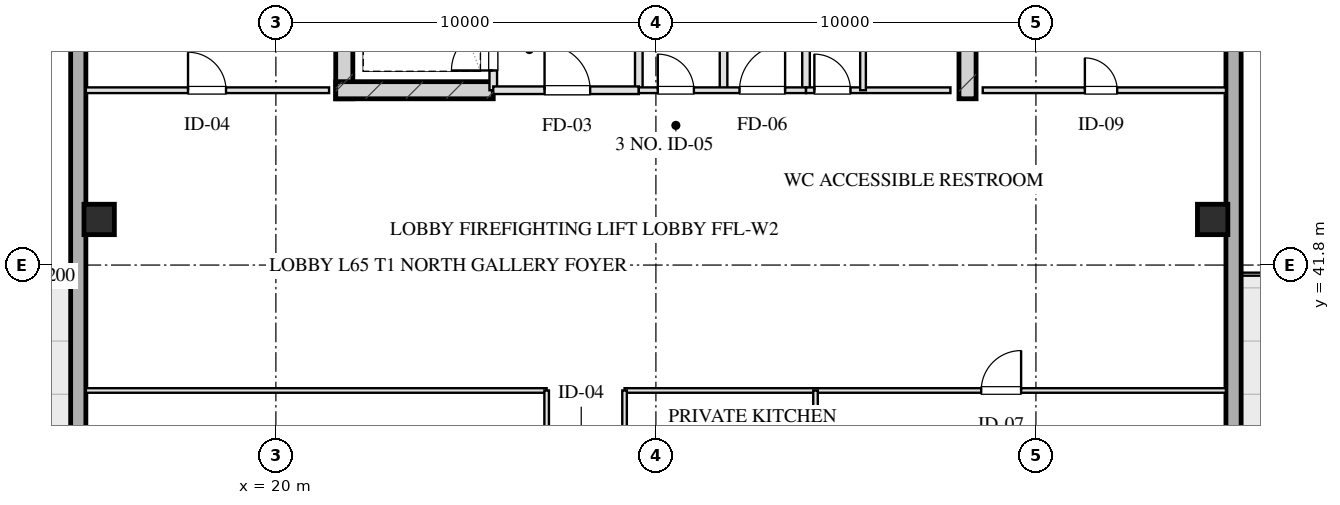
"""IFC4 building model, lengths in metres.
Left out: names, types, materials, properties, quantities, classifications, styles, units other than length and angle.
Written with IfcOpenShell. Run it as: python <this file> out.ifc"""

import sys

from ifc_helpers import new_model, si_unit, direction, frame, frame_2d, origin, origin_2d, place, context, subcontext, project, spatial, rectangle, hollow_rectangle, extrude, element, fill, save


model = new_model("IFC4")
c1 = context("Model", 3, precision=1e-05, world=origin(), true_north=direction((0.0, 1.0)))
c2 = subcontext(c1, "Body", "Model", "MODEL_VIEW")
j1 = project(units=[si_unit("LENGTHUNIT", "METRE"), si_unit("PLANEANGLEUNIT", "RADIAN")], contexts=[c1])
p1 = place(None, origin())
s1 = spatial("IfcSite", under=j1, at=p1, CompositionType="ELEMENT")
p2 = place(p1, origin())
s2 = spatial("IfcBuilding", under=s1, at=p2, CompositionType="ELEMENT")
p3 = place(p2, frame((0.0, 0.0, 240.8)))
s3 = spatial("IfcBuildingStorey", under=s2, at=p3, CompositionType="ELEMENT", Elevation=240.8)
for number, where, z_axis, x_axis in (
    (1, (21.8, 46.175, 0.0), (0.0, 0.0, 1.0), (0.0, 1.0, 0.0)),
    (2, (38.2, 46.175, 0.0), (0.0, 0.0, 1.0), (0.0, 1.0, 0.0)),
):
    element("IfcWall", number, at=place(p3, frame(where, z_axis=z_axis, x_axis=x_axis)), inside=s3, PredefinedType="SHEAR", context=c2, shape_type="SweptSolid", body=[
        extrude(rectangle(XDim=9.33, YDim=0.45, at=frame_2d((4.665, 0.0))), origin(), (0.0, 0.0, 1.0), 3.2),
    ])
p4 = place(p3, frame((21.575, 46.4, 0.0), z_axis=(0.0, 0.0, 1.0), x_axis=(1.0, 0.0, 0.0)))
e3 = element("IfcWall", 3, at=p4, inside=s3, PredefinedType="SHEAR", context=c2, shape_type="SweptSolid", body=[
    extrude(rectangle(XDim=4.145, YDim=0.45, at=frame_2d((2.073, 0.0))), origin(), (0.0, 0.0, 1.0), 3.2),
])
for number, where, z_axis, x_axis in (
    (4, (15.35, 43.0, 0.0), (0.0, 0.0, 1.0), (1.0, 0.0, 0.0)),
    (5, (44.65, 43.0, 0.0), (0.0, 0.0, 1.0), (1.0, 0.0, 0.0)),
):
    element("IfcColumn", number, at=place(p3, frame(where, z_axis=z_axis, x_axis=x_axis)), inside=s3, PredefinedType="COLUMN", context=c2, shape_type="SweptSolid", body=[
        extrude(hollow_rectangle(XDim=0.8, YDim=0.8, WallThickness=0.028, at=origin_2d()), origin(), (0.0, 0.0, 1.0), 3.201),
    ])
p5 = place(p3, frame((14.8, 13.1, 0.0), z_axis=(0.0, 0.0, 1.0), x_axis=(0.0, 1.0, 0.0)))
e6 = element("IfcWall", 6, at=p5, inside=s3, PredefinedType="SOLIDWALL", context=c2, shape_type="SweptSolid", body=[
    extrude(rectangle(XDim=41.8, YDim=0.4, at=frame_2d((20.9, 0.0))), origin(), (0.0, 0.0, 1.0), 2.36),
])
p6 = place(p5, frame((13.525, 0.0, 0.75)))
e7 = element("IfcOpeningElement", 7, at=p6, cuts=e6, PredefinedType="OPENING", context=c2, shape_type="SweptSolid", body=[
    extrude(rectangle(XDim=1.95, YDim=1.21, at=frame_2d((0.975, 0.605))), frame((0.0, 0.21, 0.0), z_axis=(0.0, -1.0, 0.0), x_axis=(1.0, 0.0, 0.0)), (0.0, 0.0, 1.0), 0.42),
])
p7 = place(p5, frame((17.325, 0.0, 0.75)))
e8 = element("IfcOpeningElement", 8, at=p7, cuts=e6, PredefinedType="OPENING", context=c2, shape_type="SweptSolid", body=[
    extrude(rectangle(XDim=1.95, YDim=1.21, at=frame_2d((0.975, 0.605))), frame((0.0, 0.21, 0.0), z_axis=(0.0, -1.0, 0.0), x_axis=(1.0, 0.0, 0.0)), (0.0, 0.0, 1.0), 0.42),
])
p8 = place(p5, frame((23.2, 0.0, 0.0)))
e9 = element("IfcOpeningElement", 9, at=p8, cuts=e6, PredefinedType="OPENING", context=c2, shape_type="SweptSolid", body=[
    extrude(rectangle(XDim=1.1, YDim=2.15, at=frame_2d((0.55, 1.075))), frame((0.0, 0.21, 0.0), z_axis=(0.0, -1.0, 0.0), x_axis=(1.0, 0.0, 0.0)), (0.0, 0.0, 1.0), 0.42),
])
p9 = place(p3, frame((45.2, 54.9, 0.0), z_axis=(0.0, 0.0, 1.0), x_axis=(0.0, -1.0, 0.0)))
e10 = element("IfcWall", 10, at=p9, inside=s3, PredefinedType="SOLIDWALL", context=c2, shape_type="SweptSolid", body=[
    extrude(rectangle(XDim=41.8, YDim=0.4, at=frame_2d((20.9, 0.0))), origin(), (0.0, 0.0, 1.0), 2.36),
])
p10 = place(p9, frame((26.325, 0.0, 0.75)))
e11 = element("IfcOpeningElement", 11, at=p10, cuts=e10, PredefinedType="OPENING", context=c2, shape_type="SweptSolid", body=[
    extrude(rectangle(XDim=1.95, YDim=1.21, at=frame_2d((0.975, 0.605))), frame((0.0, 0.21, 0.0), z_axis=(0.0, -1.0, 0.0), x_axis=(1.0, 0.0, 0.0)), (0.0, 0.0, 1.0), 0.42),
])
p11 = place(p9, frame((22.525, 0.0, 0.75)))
e12 = element("IfcOpeningElement", 12, at=p11, cuts=e10, PredefinedType="OPENING", context=c2, shape_type="SweptSolid", body=[
    extrude(rectangle(XDim=1.95, YDim=1.21, at=frame_2d((0.975, 0.605))), frame((0.0, 0.21, 0.0), z_axis=(0.0, -1.0, 0.0), x_axis=(1.0, 0.0, 0.0)), (0.0, 0.0, 1.0), 0.42),
])
p12 = place(p9, frame((17.5, 0.0, 0.0)))
e13 = element("IfcOpeningElement", 13, at=p12, cuts=e10, PredefinedType="OPENING", context=c2, shape_type="SweptSolid", body=[
    extrude(rectangle(XDim=1.1, YDim=2.15, at=frame_2d((0.55, 1.075))), frame((0.0, 0.21, 0.0), z_axis=(0.0, -1.0, 0.0), x_axis=(1.0, 0.0, 0.0)), (0.0, 0.0, 1.0), 0.42),
])
p13 = place(p3, frame((25.72, 46.4, 0.0), z_axis=(0.0, 0.0, 1.0), x_axis=(0.0, 1.0, 0.0)))
e14 = element("IfcWall", 14, at=p13, inside=s3, PredefinedType="PARTITIONING", context=c2, shape_type="SweptSolid", body=[
    extrude(rectangle(XDim=1.9, YDim=0.2, at=frame_2d((0.95, 0.0))), origin(), (0.0, 0.0, 1.0), 2.925),
])
p14 = place(p13, frame((0.52, 0.0, 0.0)))
e15 = element("IfcOpeningElement", 15, at=p14, cuts=e14, PredefinedType="OPENING", context=c2, shape_type="SweptSolid", body=[
    extrude(rectangle(XDim=1.1, YDim=2.05, at=frame_2d((0.55, 1.025))), frame((0.0, 0.11, 0.0), z_axis=(0.0, -1.0, 0.0), x_axis=(1.0, 0.0, 0.0)), (0.0, 0.0, 1.0), 0.22),
])
p15 = place(p3, frame((29.55, 46.4, 0.0), z_axis=(0.0, 0.0, 1.0), x_axis=(0.0, 1.0, 0.0)))
e16 = element("IfcWall", 16, at=p15, inside=s3, PredefinedType="PARTITIONING", context=c2, shape_type="SweptSolid", body=[
    extrude(rectangle(XDim=8.43, YDim=0.2, at=frame_2d((4.215, 0.0))), origin(), (0.0, 0.0, 1.0), 2.925),
])
p16 = place(p3, frame((25.72, 46.4, 0.0), z_axis=(0.0, 0.0, 1.0), x_axis=(1.0, 0.0, 0.0)))
e17 = element("IfcWall", 17, at=p16, inside=s3, PredefinedType="PARTITIONING", context=c2, shape_type="SweptSolid", body=[
    extrude(rectangle(XDim=3.83, YDim=0.2, at=frame_2d((1.915, 0.0))), origin(), (0.0, 0.0, 1.0), 2.925),
])
p17 = place(p16, frame((1.35, 0.0, 0.0)))
e18 = element("IfcOpeningElement", 18, at=p17, cuts=e17, PredefinedType="OPENING", context=c2, shape_type="SweptSolid", body=[
    extrude(rectangle(XDim=1.2, YDim=2.05, at=frame_2d((0.6, 1.025))), frame((0.0, 0.11, 0.0), z_axis=(0.0, -1.0, 0.0), x_axis=(1.0, 0.0, 0.0)), (0.0, 0.0, 1.0), 0.22),
])
for number, where, z_axis, x_axis in (
    (19, (33.95, 46.4, 0.0), (0.0, 0.0, 1.0), (0.0, 1.0, 0.0)),
    (20, (31.78, 46.4, 0.0), (0.0, 0.0, 1.0), (0.0, 1.0, 0.0)),
):
    element("IfcWall", number, at=place(p3, frame(where, z_axis=z_axis, x_axis=x_axis)), inside=s3, PredefinedType="PARTITIONING", context=c2, shape_type="SweptSolid", body=[
        extrude(rectangle(XDim=8.43, YDim=0.2, at=frame_2d((4.215, 0.0))), origin(), (0.0, 0.0, 1.0), 2.925),
    ])
p18 = place(p3, frame((29.55, 46.4, 0.0), z_axis=(0.0, 0.0, 1.0), x_axis=(1.0, 0.0, 0.0)))
e21 = element("IfcWall", 21, at=p18, inside=s3, PredefinedType="PARTITIONING", context=c2, shape_type="SweptSolid", body=[
    extrude(rectangle(XDim=4.4, YDim=0.15, at=frame_2d((2.2, 0.0))), origin(), (0.0, 0.0, 1.0), 2.925),
])
p19 = place(p18, frame((0.5, 0.0, 0.0)))
e22 = element("IfcOpeningElement", 22, at=p19, cuts=e21, PredefinedType="OPENING", context=c2, shape_type="SweptSolid", body=[
    extrude(rectangle(XDim=0.95, YDim=2.05, at=frame_2d((0.475, 1.025))), frame((0.0, 0.085, 0.0), z_axis=(0.0, -1.0, 0.0), x_axis=(1.0, 0.0, 0.0)), (0.0, 0.0, 1.0), 0.17),
])
p20 = place(p18, frame((2.65, 0.0, 0.0)))
e23 = element("IfcOpeningElement", 23, at=p20, cuts=e21, PredefinedType="OPENING", context=c2, shape_type="SweptSolid", body=[
    extrude(rectangle(XDim=1.2, YDim=2.05, at=frame_2d((0.6, 1.025))), frame((0.0, 0.085, 0.0), z_axis=(0.0, -1.0, 0.0), x_axis=(1.0, 0.0, 0.0)), (0.0, 0.0, 1.0), 0.17),
])
p21 = place(p3, frame((33.95, 46.4, 0.0), z_axis=(0.0, 0.0, 1.0), x_axis=(1.0, 0.0, 0.0)))
e24 = element("IfcWall", 24, at=p21, inside=s3, PredefinedType="PARTITIONING", context=c2, shape_type="SweptSolid", body=[
    extrude(rectangle(XDim=3.8, YDim=0.15, at=frame_2d((1.9, 0.0))), origin(), (0.0, 0.0, 1.0), 2.925),
])
p22 = place(p21, frame((0.22, 0.0, 0.0)))
e25 = element("IfcOpeningElement", 25, at=p22, cuts=e24, PredefinedType="OPENING", context=c2, shape_type="SweptSolid", body=[
    extrude(rectangle(XDim=0.95, YDim=2.05, at=frame_2d((0.475, 1.025))), frame((0.0, 0.085, 0.0), z_axis=(0.0, -1.0, 0.0), x_axis=(1.0, 0.0, 0.0)), (0.0, 0.0, 1.0), 0.17),
])
p23 = place(p3, frame((35.45, 46.4, 0.0), z_axis=(0.0, 0.0, 1.0), x_axis=(0.0, 1.0, 0.0)))
e26 = element("IfcWall", 26, at=p23, inside=s3, PredefinedType="PARTITIONING", context=c2, shape_type="SweptSolid", body=[
    extrude(rectangle(XDim=8.43, YDim=0.15, at=frame_2d((4.215, 0.0))), origin(), (0.0, 0.0, 1.0), 2.565),
])
p24 = place(p23, frame((2.55, 0.0, 0.0)))
e27 = element("IfcOpeningElement", 27, at=p24, cuts=e26, PredefinedType="OPENING", context=c2, shape_type="SweptSolid", body=[
    extrude(rectangle(XDim=0.95, YDim=2.05, at=frame_2d((0.475, 1.025))), frame((0.0, 0.085, 0.0), z_axis=(0.0, -1.0, 0.0), x_axis=(1.0, 0.0, 0.0)), (0.0, 0.0, 1.0), 0.17),
])
p25 = place(p23, frame((5.8, 0.0, 0.0)))
e28 = element("IfcOpeningElement", 28, at=p25, cuts=e26, PredefinedType="OPENING", context=c2, shape_type="SweptSolid", body=[
    extrude(rectangle(XDim=0.9, YDim=2.05, at=frame_2d((0.45, 1.025))), frame((0.0, 0.085, 0.0), z_axis=(0.0, -1.0, 0.0), x_axis=(1.0, 0.0, 0.0)), (0.0, 0.0, 1.0), 0.17),
])
p26 = place(p3, frame((15.0, 46.4, 0.0), z_axis=(0.0, 0.0, 1.0), x_axis=(1.0, 0.0, 0.0)))
e29 = element("IfcWall", 29, at=p26, inside=s3, PredefinedType="PARTITIONING", context=c2, shape_type="SweptSolid", body=[
    extrude(rectangle(XDim=6.4, YDim=0.15, at=frame_2d((3.2, 0.0))), origin(), (0.0, 0.0, 1.0), 2.925),
])
p27 = place(p26, frame((2.688, 0.0, 0.0)))
e30 = element("IfcOpeningElement", 30, at=p27, cuts=e29, PredefinedType="OPENING", context=c2, shape_type="SweptSolid", body=[
    extrude(rectangle(XDim=1.0, YDim=2.05, at=frame_2d((0.5, 1.025))), frame((0.0, 0.085, 0.0), z_axis=(0.0, -1.0, 0.0), x_axis=(1.0, 0.0, 0.0)), (0.0, 0.0, 1.0), 0.17),
])
p28 = place(p3, frame((38.6, 46.4, 0.0), z_axis=(0.0, 0.0, 1.0), x_axis=(1.0, 0.0, 0.0)))
e31 = element("IfcWall", 31, at=p28, inside=s3, PredefinedType="PARTITIONING", context=c2, shape_type="SweptSolid", body=[
    extrude(rectangle(XDim=6.4, YDim=0.15, at=frame_2d((3.2, 0.0))), origin(), (0.0, 0.0, 1.0), 2.925),
])
p29 = place(p28, frame((2.688, 0.0, 0.0)))
e32 = element("IfcOpeningElement", 32, at=p29, cuts=e31, PredefinedType="OPENING", context=c2, shape_type="SweptSolid", body=[
    extrude(rectangle(XDim=0.85, YDim=2.05, at=frame_2d((0.425, 1.025))), frame((0.0, 0.085, 0.0), z_axis=(0.0, -1.0, 0.0), x_axis=(1.0, 0.0, 0.0)), (0.0, 0.0, 1.0), 0.17),
])
p30 = place(p3, frame((15.0, 38.5, 0.0), z_axis=(0.0, 0.0, 1.0), x_axis=(1.0, 0.0, 0.0)))
e33 = element("IfcWall", 33, at=p30, inside=s3, PredefinedType="PARTITIONING", context=c2, shape_type="SweptSolid", body=[
    extrude(rectangle(XDim=12.125, YDim=0.12, at=frame_2d((6.062, 0.0))), origin(), (0.0, 0.0, 1.0), 2.925),
])
p31 = place(p3, frame((29.175, 38.5, 0.0), z_axis=(0.0, 0.0, 1.0), x_axis=(1.0, 0.0, 0.0)))
e34 = element("IfcWall", 34, at=p31, inside=s3, PredefinedType="PARTITIONING", context=c2, shape_type="SweptSolid", body=[
    extrude(rectangle(XDim=15.825, YDim=0.12, at=frame_2d((7.913, 0.0))), origin(), (0.0, 0.0, 1.0), 2.925),
])
p32 = place(p31, frame((9.385, 0.0, 0.0)))
e35 = element("IfcOpeningElement", 35, at=p32, cuts=e34, PredefinedType="OPENING", context=c2, shape_type="SweptSolid", body=[
    extrude(rectangle(XDim=1.05, YDim=2.05, at=frame_2d((0.525, 1.025))), frame((0.0, 0.07, 0.0), z_axis=(0.0, -1.0, 0.0), x_axis=(1.0, 0.0, 0.0)), (0.0, 0.0, 1.0), 0.14),
])
p33 = place(p3, frame((27.125, 29.5, 0.0), z_axis=(0.0, 0.0, 1.0), x_axis=(0.0, 1.0, 0.0)))
e36 = element("IfcWall", 36, at=p33, inside=s3, PredefinedType="PARTITIONING", context=c2, shape_type="SweptSolid", body=[
    extrude(rectangle(XDim=9.0, YDim=0.12, at=frame_2d((4.5, 0.0))), origin(), (0.0, 0.0, 1.0), 2.925),
])
p34 = place(p33, frame((2.335, 0.0, 0.0)))
e37 = element("IfcOpeningElement", 37, at=p34, cuts=e36, PredefinedType="OPENING", context=c2, shape_type="SweptSolid", body=[
    extrude(rectangle(XDim=1.0, YDim=2.05, at=frame_2d((0.5, 1.025))), frame((0.0, 0.07, 0.0), z_axis=(0.0, -1.0, 0.0), x_axis=(1.0, 0.0, 0.0)), (0.0, 0.0, 1.0), 0.14),
])
p35 = place(p33, frame((6.835, 0.0, 0.0)))
e38 = element("IfcOpeningElement", 38, at=p35, cuts=e36, PredefinedType="OPENING", context=c2, shape_type="SweptSolid", body=[
    extrude(rectangle(XDim=1.0, YDim=2.05, at=frame_2d((0.5, 1.025))), frame((0.0, 0.07, 0.0), z_axis=(0.0, -1.0, 0.0), x_axis=(1.0, 0.0, 0.0)), (0.0, 0.0, 1.0), 0.14),
])
p36 = place(p3, frame((29.175, 29.5, 0.0), z_axis=(0.0, 0.0, 1.0), x_axis=(0.0, 1.0, 0.0)))
e39 = element("IfcWall", 39, at=p36, inside=s3, PredefinedType="PARTITIONING", context=c2, shape_type="SweptSolid", body=[
    extrude(rectangle(XDim=9.0, YDim=0.12, at=frame_2d((4.5, 0.0))), origin(), (0.0, 0.0, 1.0), 2.925),
])
p37 = place(p36, frame((1.165, 0.0, 0.0)))
e40 = element("IfcOpeningElement", 40, at=p37, cuts=e39, PredefinedType="OPENING", context=c2, shape_type="SweptSolid", body=[
    extrude(rectangle(XDim=1.0, YDim=2.05, at=frame_2d((0.5, 1.025))), frame((0.0, 0.07, 0.0), z_axis=(0.0, -1.0, 0.0), x_axis=(1.0, 0.0, 0.0)), (0.0, 0.0, 1.0), 0.14),
])
p38 = place(p36, frame((4.0, 0.0, 0.0)))
e41 = element("IfcOpeningElement", 41, at=p38, cuts=e39, PredefinedType="OPENING", context=c2, shape_type="SweptSolid", body=[
    extrude(rectangle(XDim=1.0, YDim=2.05, at=frame_2d((0.5, 1.025))), frame((0.0, 0.07, 0.0), z_axis=(0.0, -1.0, 0.0), x_axis=(1.0, 0.0, 0.0)), (0.0, 0.0, 1.0), 0.14),
])
p39 = place(p36, frame((6.835, 0.0, 0.0)))
e42 = element("IfcOpeningElement", 42, at=p39, cuts=e39, PredefinedType="OPENING", context=c2, shape_type="SweptSolid", body=[
    extrude(rectangle(XDim=1.0, YDim=2.05, at=frame_2d((0.5, 1.025))), frame((0.0, 0.07, 0.0), z_axis=(0.0, -1.0, 0.0), x_axis=(1.0, 0.0, 0.0)), (0.0, 0.0, 1.0), 0.14),
])
p40 = place(p3, frame((34.2, 35.17, 0.0), z_axis=(0.0, 0.0, 1.0), x_axis=(0.0, 1.0, 0.0)))
e43 = element("IfcWall", 43, at=p40, inside=s3, PredefinedType="PARTITIONING", context=c2, shape_type="SweptSolid", body=[
    extrude(rectangle(XDim=3.33, YDim=0.12, at=frame_2d((1.665, 0.0))), origin(), (0.0, 0.0, 1.0), 2.925),
])
p41 = place(p14, origin())
e44 = element("IfcDoor", 44, at=p41, inside=s3, OperationType="SINGLE_SWING_LEFT", PredefinedType="DOOR", context=c2, shape_type="SweptSolid", body=[
    extrude(rectangle(XDim=1.1, YDim=2.05, at=frame_2d((0.55, 1.025))), frame((0.0, 0.025, 0.0), z_axis=(0.0, -1.0, 0.0), x_axis=(1.0, 0.0, 0.0)), (0.0, 0.0, 1.0), 0.05),
])
fill(e15, e44)
p42 = place(p17, origin())
e45 = element("IfcDoor", 45, at=p42, inside=s3, OperationType="SINGLE_SWING_LEFT", PredefinedType="DOOR", context=c2, shape_type="SweptSolid", body=[
    extrude(rectangle(XDim=1.2, YDim=2.05, at=frame_2d((0.6, 1.025))), frame((0.0, 0.025, 0.0), z_axis=(0.0, -1.0, 0.0), x_axis=(1.0, 0.0, 0.0)), (0.0, 0.0, 1.0), 0.05),
])
fill(e18, e45)
p43 = place(p19, origin())
e46 = element("IfcDoor", 46, at=p43, inside=s3, OperationType="SINGLE_SWING_LEFT", PredefinedType="DOOR", context=c2, shape_type="SweptSolid", body=[
    extrude(rectangle(XDim=0.95, YDim=2.05, at=frame_2d((0.475, 1.025))), frame((0.0, 0.025, 0.0), z_axis=(0.0, -1.0, 0.0), x_axis=(1.0, 0.0, 0.0)), (0.0, 0.0, 1.0), 0.05),
])
fill(e22, e46)
p44 = place(p20, origin())
e47 = element("IfcDoor", 47, at=p44, inside=s3, OperationType="SINGLE_SWING_RIGHT", PredefinedType="DOOR", context=c2, shape_type="SweptSolid", body=[
    extrude(rectangle(XDim=1.2, YDim=2.05, at=frame_2d((0.6, 1.025))), frame((0.0, 0.025, 0.0), z_axis=(0.0, -1.0, 0.0), x_axis=(1.0, 0.0, 0.0)), (0.0, 0.0, 1.0), 0.05),
])
fill(e23, e47)
p45 = place(p22, origin())
e48 = element("IfcDoor", 48, at=p45, inside=s3, OperationType="SINGLE_SWING_LEFT", PredefinedType="DOOR", context=c2, shape_type="SweptSolid", body=[
    extrude(rectangle(XDim=0.95, YDim=2.05, at=frame_2d((0.475, 1.025))), frame((0.0, 0.025, 0.0), z_axis=(0.0, -1.0, 0.0), x_axis=(1.0, 0.0, 0.0)), (0.0, 0.0, 1.0), 0.05),
])
fill(e25, e48)
p46 = place(p27, origin())
e49 = element("IfcDoor", 49, at=p46, inside=s3, OperationType="SINGLE_SWING_LEFT", PredefinedType="DOOR", context=c2, shape_type="SweptSolid", body=[
    extrude(rectangle(XDim=1.0, YDim=2.05, at=frame_2d((0.5, 1.025))), frame((0.0, 0.025, 0.0), z_axis=(0.0, -1.0, 0.0), x_axis=(1.0, 0.0, 0.0)), (0.0, 0.0, 1.0), 0.05),
])
fill(e30, e49)
p47 = place(p29, origin())
e50 = element("IfcDoor", 50, at=p47, inside=s3, OperationType="SINGLE_SWING_LEFT", PredefinedType="DOOR", context=c2, shape_type="SweptSolid", body=[
    extrude(rectangle(XDim=0.85, YDim=2.05, at=frame_2d((0.425, 1.025))), frame((0.0, 0.025, 0.0), z_axis=(0.0, -1.0, 0.0), x_axis=(1.0, 0.0, 0.0)), (0.0, 0.0, 1.0), 0.05),
])
fill(e32, e50)
p48 = place(p32, origin())
e51 = element("IfcDoor", 51, at=p48, inside=s3, OperationType="SINGLE_SWING_RIGHT", PredefinedType="DOOR", context=c2, shape_type="SweptSolid", body=[
    extrude(rectangle(XDim=1.05, YDim=2.05, at=frame_2d((0.525, 1.025))), frame((0.0, 0.025, 0.0), z_axis=(0.0, -1.0, 0.0), x_axis=(1.0, 0.0, 0.0)), (0.0, 0.0, 1.0), 0.05),
])
fill(e35, e51)
save(model, sys.argv[1])
